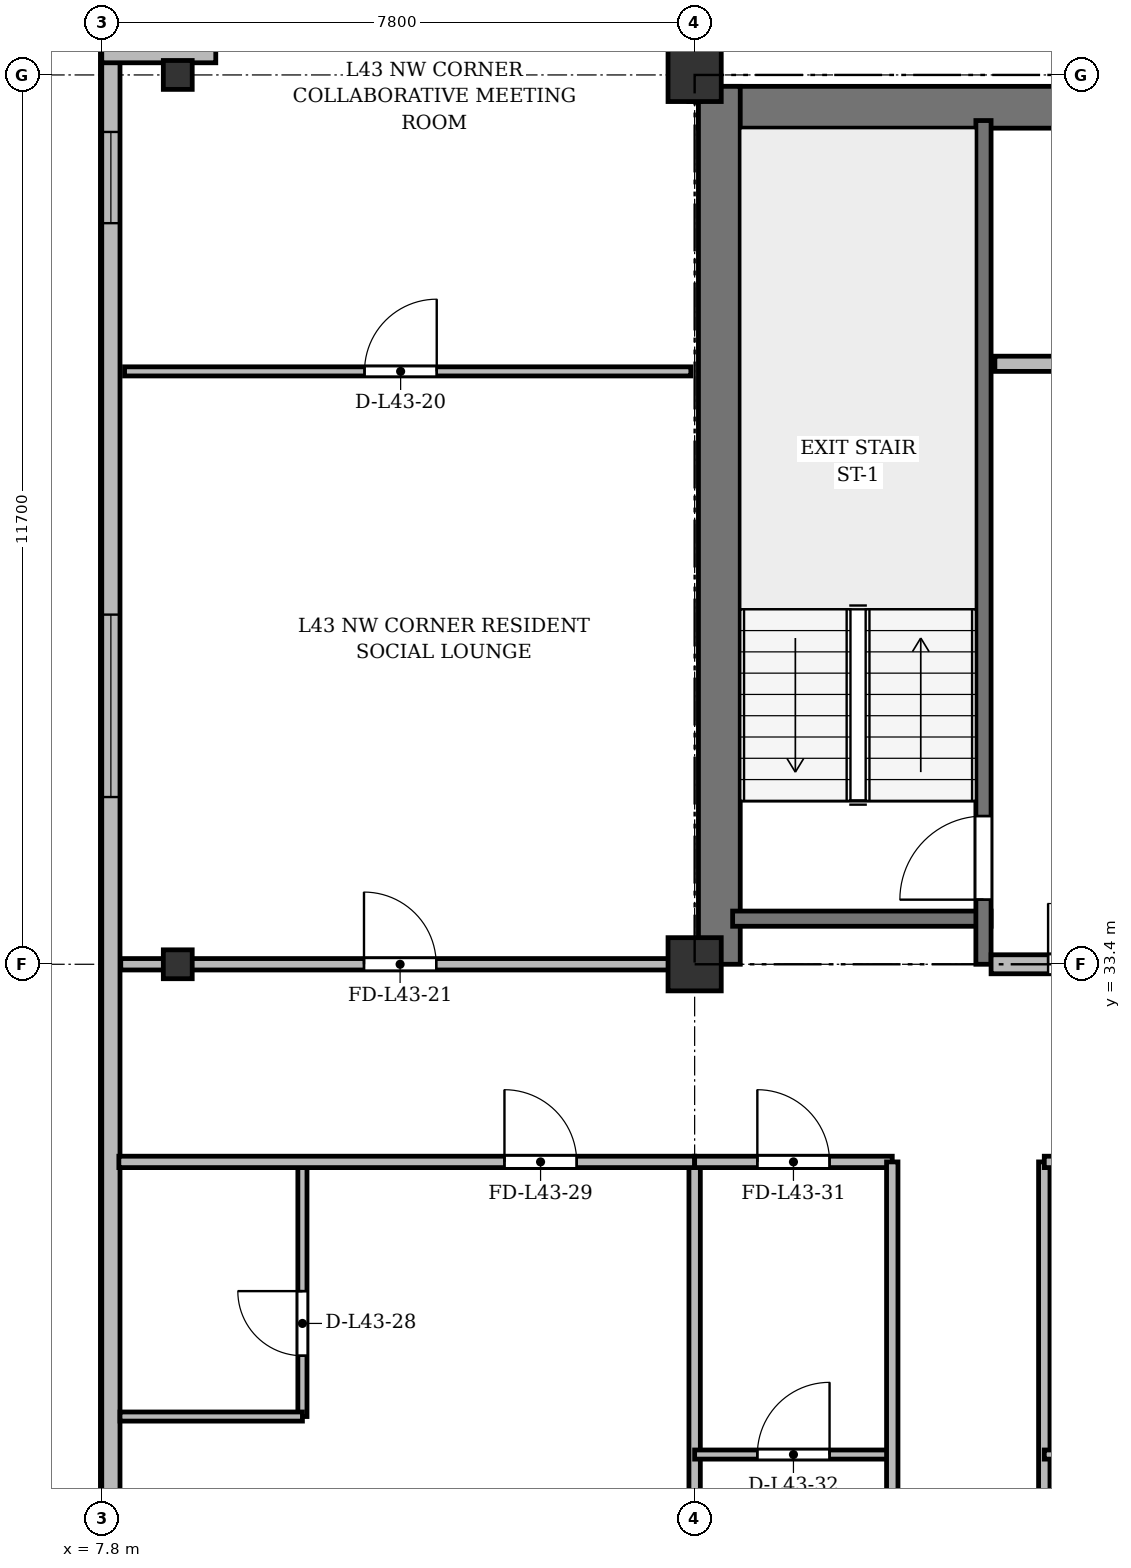
"""IFC4 building model, lengths in metres.
Left out: names, types, materials, properties, quantities, classifications, styles, units other than length and angle.
Written with IfcOpenShell. Run it as: python <this file> out.ifc"""

import sys

from ifc_helpers import new_model, si_unit, direction, frame, frame_2d, origin, origin_2d, place, context, subcontext, project, spatial, rectangle, i_section, extrude, source, transform, mapped, element, fill, save


model = new_model("IFC4")
c1 = context("Model", 3, precision=1e-05, world=origin(), true_north=direction((0.0, 1.0)))
c2 = subcontext(c1, "Body", "Model", "MODEL_VIEW")
j1 = project(units=[si_unit("LENGTHUNIT", "METRE"), si_unit("PLANEANGLEUNIT", "RADIAN")], contexts=[c1])
p1 = place(None, origin())
s1 = spatial("IfcSite", under=j1, at=p1, CompositionType="ELEMENT")
p2 = place(p1, origin())
s2 = spatial("IfcBuilding", under=s1, at=p2, CompositionType="ELEMENT")
p3 = place(p2, frame((0.0, 0.0, 164.5)))
s3 = spatial("IfcBuildingStorey", under=s2, at=p3, CompositionType="ELEMENT", Elevation=164.5)
m1 = source(origin(), c2, "Body", "SweptSolid", [
    extrude(i_section(OverallWidth=0.38, OverallDepth=0.38, WebThickness=0.02, FlangeThickness=0.03, at=origin_2d()), origin(), (0.0, 0.0, 1.0), 3.6),
])
for number, where, z_axis, x_axis in (
    (1, (8.8, 33.4, 0.0), (0.0, 0.0, 1.0), (1.0, 0.0, 0.0)),
    (2, (8.8, 45.1, 0.0), (0.0, 0.0, 1.0), (1.0, 0.0, 0.0)),
):
    element("IfcColumn", number, at=place(p3, frame(where, z_axis=z_axis, x_axis=x_axis)), inside=s3, PredefinedType="COLUMN", context=c2, shape_type="MappedRepresentation", body=[
        mapped(m1, transform((0.0, 0.0, 0.0), x_axis=(1.0, 0.0, 0.0), y_axis=(0.0, 1.0, 0.0), z_axis=(0.0, 0.0, 1.0), scale=1.0)),
    ])
m2 = source(origin(), c2, "Body", "SweptSolid", [
    extrude(rectangle(XDim=0.7, YDim=0.7, at=origin_2d()), origin(), (0.0, 0.0, 1.0), 3.6),
])
for number, where, z_axis, x_axis in (
    (3, (15.6, 33.4, 0.0), (0.0, 0.0, 1.0), (1.0, 0.0, 0.0)),
    (4, (15.6, 45.1, 0.0), (0.0, 0.0, 1.0), (1.0, 0.0, 0.0)),
):
    element("IfcColumn", number, at=place(p3, frame(where, z_axis=z_axis, x_axis=x_axis)), inside=s3, PredefinedType="COLUMN", context=c2, shape_type="MappedRepresentation", body=[
        mapped(m2, transform((0.0, 0.0, 0.0), x_axis=(1.0, 0.0, 0.0), y_axis=(0.0, 1.0, 0.0), z_axis=(0.0, 0.0, 1.0), scale=1.0)),
    ])
p4 = place(p3, frame((7.92, 6.3, 0.0), z_axis=(0.0, 0.0, 1.0), x_axis=(0.0, 1.0, 0.0)))
e5 = element("IfcWall", 5, at=p4, inside=s3, PredefinedType="SOLIDWALL", context=c2, shape_type="SweptSolid", body=[
    extrude(rectangle(XDim=39.2, YDim=0.24, at=frame_2d((19.6, 0.0))), origin(), (0.0, 0.0, 1.0), 3.35),
])
p5 = place(p4, frame((1.45, 0.0, 0.92)))
e6 = element("IfcOpeningElement", 6, at=p5, cuts=e5, PredefinedType="OPENING", context=c2, shape_type="SweptSolid", body=[
    extrude(rectangle(XDim=1.2, YDim=1.65, at=frame_2d((0.6, 0.825))), frame((0.0, 0.13, 0.0), z_axis=(0.0, -1.0, 0.0), x_axis=(1.0, 0.0, 0.0)), (0.0, 0.0, 1.0), 0.26),
])
p6 = place(p4, frame((3.9, 0.0, 0.92)))
e7 = element("IfcOpeningElement", 7, at=p6, cuts=e5, PredefinedType="OPENING", context=c2, shape_type="SweptSolid", body=[
    extrude(rectangle(XDim=2.4, YDim=2.1, at=frame_2d((1.2, 1.05))), frame((0.0, 0.13, 0.0), z_axis=(0.0, -1.0, 0.0), x_axis=(1.0, 0.0, 0.0)), (0.0, 0.0, 1.0), 0.26),
])
p7 = place(p4, frame((8.1, 0.0, 0.92)))
e8 = element("IfcOpeningElement", 8, at=p7, cuts=e5, PredefinedType="OPENING", context=c2, shape_type="SweptSolid", body=[
    extrude(rectangle(XDim=2.4, YDim=2.1, at=frame_2d((1.2, 1.05))), frame((0.0, 0.13, 0.0), z_axis=(0.0, -1.0, 0.0), x_axis=(1.0, 0.0, 0.0)), (0.0, 0.0, 1.0), 0.26),
])
p8 = place(p4, frame((15.3, 0.0, 0.92)))
e9 = element("IfcOpeningElement", 9, at=p8, cuts=e5, PredefinedType="OPENING", context=c2, shape_type="SweptSolid", body=[
    extrude(rectangle(XDim=2.4, YDim=2.1, at=frame_2d((1.2, 1.05))), frame((0.0, 0.13, 0.0), z_axis=(0.0, -1.0, 0.0), x_axis=(1.0, 0.0, 0.0)), (0.0, 0.0, 1.0), 0.26),
])
p9 = place(p4, frame((29.3, 0.0, 0.92)))
e10 = element("IfcOpeningElement", 10, at=p9, cuts=e5, PredefinedType="OPENING", context=c2, shape_type="SweptSolid", body=[
    extrude(rectangle(XDim=2.4, YDim=2.1, at=frame_2d((1.2, 1.05))), frame((0.0, 0.13, 0.0), z_axis=(0.0, -1.0, 0.0), x_axis=(1.0, 0.0, 0.0)), (0.0, 0.0, 1.0), 0.26),
])
p10 = place(p4, frame((36.85, 0.0, 0.92)))
e11 = element("IfcOpeningElement", 11, at=p10, cuts=e5, PredefinedType="OPENING", context=c2, shape_type="SweptSolid", body=[
    extrude(rectangle(XDim=1.2, YDim=1.65, at=frame_2d((0.6, 0.825))), frame((0.0, 0.13, 0.0), z_axis=(0.0, -1.0, 0.0), x_axis=(1.0, 0.0, 0.0)), (0.0, 0.0, 1.0), 0.26),
])
p11 = place(p3, frame((7.8, 45.38, 0.0), z_axis=(0.0, 0.0, 1.0), x_axis=(1.0, 0.0, 0.0)))
e12 = element("IfcWall", 12, at=p11, inside=s3, PredefinedType="SOLIDWALL", context=c2, shape_type="SweptSolid", body=[
    extrude(rectangle(XDim=1.5, YDim=0.24, at=frame_2d((0.75, 0.0))), origin(), (0.0, 0.0, 1.0), 3.35),
])
p12 = place(p3, frame((15.65, 44.675, 0.0), z_axis=(0.0, 0.0, 1.0), x_axis=(1.0, 0.0, 0.0)))
e13 = element("IfcWall", 13, at=p12, inside=s3, PredefinedType="SHEAR", context=c2, shape_type="SweptSolid", body=[
    extrude(rectangle(XDim=43.1, YDim=0.55, at=frame_2d((21.55, 0.0))), origin(), (0.0, 0.0, 1.0), 3.35),
])
p13 = place(p3, frame((15.925, 33.4, 0.0), z_axis=(0.0, 0.0, 1.0), x_axis=(0.0, 1.0, 0.0)))
e14 = element("IfcWall", 14, at=p13, inside=s3, PredefinedType="SHEAR", context=c2, shape_type="SweptSolid", body=[
    extrude(rectangle(XDim=11.55, YDim=0.55, at=frame_2d((5.775, 0.0))), origin(), (0.0, 0.0, 1.0), 3.35),
])
p14 = place(p3, frame((16.1, 34.0, 0.0), z_axis=(0.0, 0.0, 1.0), x_axis=(1.0, 0.0, 0.0)))
e15 = element("IfcWall", 15, at=p14, inside=s3, PredefinedType="SHEAR", context=c2, shape_type="SweptSolid", body=[
    extrude(rectangle(XDim=3.4, YDim=0.2, at=frame_2d((1.7, 0.0))), origin(), (0.0, 0.0, 1.0), 3.35),
])
p15 = place(p3, frame((19.4, 33.4, 0.0), z_axis=(0.0, 0.0, 1.0), x_axis=(0.0, 1.0, 0.0)))
e16 = element("IfcWall", 16, at=p15, inside=s3, PredefinedType="SHEAR", context=c2, shape_type="SweptSolid", body=[
    extrude(rectangle(XDim=11.1, YDim=0.2, at=frame_2d((5.55, 0.0))), origin(), (0.0, 0.0, 1.0), 3.35),
])
p16 = place(p15, frame((0.85, 0.0, 0.0)))
e17 = element("IfcOpeningElement", 17, at=p16, cuts=e16, PredefinedType="OPENING", context=c2, shape_type="SweptSolid", body=[
    extrude(rectangle(XDim=1.1, YDim=2.15, at=frame_2d((0.55, 1.075))), frame((0.0, 0.11, 0.0), z_axis=(0.0, -1.0, 0.0), x_axis=(1.0, 0.0, 0.0)), (0.0, 0.0, 1.0), 0.22),
])
p17 = place(p3, frame((19.55, 41.3, 0.0), z_axis=(0.0, 0.0, 1.0), x_axis=(1.0, 0.0, 0.0)))
e18 = element("IfcWall", 18, at=p17, inside=s3, PredefinedType="SOLIDWALL", context=c2, shape_type="SweptSolid", body=[
    extrude(rectangle(XDim=6.75, YDim=0.2, at=frame_2d((3.375, 0.0))), origin(), (0.0, 0.0, 1.0), 3.35),
])
p18 = place(p17, frame((1.7, 0.0, 0.0)))
e19 = element("IfcOpeningElement", 19, at=p18, cuts=e18, PredefinedType="OPENING", context=c2, shape_type="SweptSolid", body=[
    extrude(rectangle(XDim=1.1, YDim=2.15, at=frame_2d((0.55, 1.075))), frame((0.0, 0.11, 0.0), z_axis=(0.0, -1.0, 0.0), x_axis=(1.0, 0.0, 0.0)), (0.0, 0.0, 1.0), 0.22),
])
p19 = place(p17, frame((4.4, 0.0, 0.0)))
e20 = element("IfcOpeningElement", 20, at=p19, cuts=e18, PredefinedType="OPENING", context=c2, shape_type="SweptSolid", body=[
    extrude(rectangle(XDim=1.1, YDim=2.15, at=frame_2d((0.55, 1.075))), frame((0.0, 0.11, 0.0), z_axis=(0.0, -1.0, 0.0), x_axis=(1.0, 0.0, 0.0)), (0.0, 0.0, 1.0), 0.22),
])
p20 = place(p3, frame((19.5, 33.4, 0.0), z_axis=(0.0, 0.0, 1.0), x_axis=(1.0, 0.0, 0.0)))
e21 = element("IfcWall", 21, at=p20, inside=s3, PredefinedType="PARTITIONING", context=c2, shape_type="SweptSolid", body=[
    extrude(rectangle(XDim=6.8, YDim=0.25, at=frame_2d((3.4, 0.0))), origin(), (0.0, 0.0, 1.0), 2.75),
])
p21 = place(p20, frame((0.75, 0.0, 0.0)))
e22 = element("IfcOpeningElement", 22, at=p21, cuts=e21, PredefinedType="OPENING", context=c2, shape_type="SweptSolid", body=[
    extrude(rectangle(XDim=1.6, YDim=2.2, at=frame_2d((0.8, 1.1))), frame((0.0, 0.135, 0.0), z_axis=(0.0, -1.0, 0.0), x_axis=(1.0, 0.0, 0.0)), (0.0, 0.0, 1.0), 0.27),
])
p22 = place(p3, frame((8.1, 41.2, 0.0), z_axis=(0.0, 0.0, 1.0), x_axis=(1.0, 0.0, 0.0)))
e23 = element("IfcWall", 23, at=p22, inside=s3, PredefinedType="PARTITIONING", context=c2, shape_type="SweptSolid", body=[
    extrude(rectangle(XDim=7.45, YDim=0.12, at=frame_2d((3.725, 0.0))), origin(), (0.0, 0.0, 1.0), 2.85),
])
p23 = place(p22, frame((3.157, 0.0, 0.0)))
e24 = element("IfcOpeningElement", 24, at=p23, cuts=e23, PredefinedType="OPENING", context=c2, shape_type="SweptSolid", body=[
    extrude(rectangle(XDim=0.95, YDim=2.15, at=frame_2d((0.475, 1.075))), frame((0.0, 0.07, 0.0), z_axis=(0.0, -1.0, 0.0), x_axis=(1.0, 0.0, 0.0)), (0.0, 0.0, 1.0), 0.14),
])
p24 = place(p3, frame((8.05, 33.4, 0.0), z_axis=(0.0, 0.0, 1.0), x_axis=(1.0, 0.0, 0.0)))
e25 = element("IfcWall", 25, at=p24, inside=s3, PredefinedType="PARTITIONING", context=c2, shape_type="SweptSolid", body=[
    extrude(rectangle(XDim=7.55, YDim=0.15, at=frame_2d((3.775, 0.0))), origin(), (0.0, 0.0, 1.0), 2.75),
])
p25 = place(p24, frame((3.2, 0.0, 0.0)))
e26 = element("IfcOpeningElement", 26, at=p25, cuts=e25, PredefinedType="OPENING", context=c2, shape_type="SweptSolid", body=[
    extrude(rectangle(XDim=0.95, YDim=2.15, at=frame_2d((0.475, 1.075))), frame((0.0, 0.085, 0.0), z_axis=(0.0, -1.0, 0.0), x_axis=(1.0, 0.0, 0.0)), (0.0, 0.0, 1.0), 0.17),
])
p26 = place(p3, frame((15.6, 44.75, 0.0), z_axis=(0.0, 0.0, 1.0), x_axis=(0.0, 1.0, 0.0)))
e27 = element("IfcWall", 27, at=p26, inside=s3, PredefinedType="PARTITIONING", context=c2, shape_type="SweptSolid", body=[
    extrude(rectangle(XDim=3.61, YDim=0.15, at=frame_2d((1.805, 0.0))), origin(), (0.0, 0.0, 1.0), 2.85),
])
p27 = place(p26, frame((1.1, 0.0, 0.0)))
e28 = element("IfcOpeningElement", 28, at=p27, cuts=e27, PredefinedType="OPENING", context=c2, shape_type="SweptSolid", body=[
    extrude(rectangle(XDim=0.95, YDim=2.15, at=frame_2d((0.475, 1.075))), frame((0.0, 0.085, 0.0), z_axis=(0.0, -1.0, 0.0), x_axis=(1.0, 0.0, 0.0)), (0.0, 0.0, 1.0), 0.17),
])
p28 = place(p3, frame((15.6, 3.525, 0.0), z_axis=(0.0, 0.0, 1.0), x_axis=(0.0, 1.0, 0.0)))
e29 = element("IfcWall", 29, at=p28, inside=s3, PredefinedType="PARTITIONING", context=c2, shape_type="SweptSolid", body=[
    extrude(rectangle(XDim=27.275, YDim=0.15, at=frame_2d((13.638, 0.0))), origin(), (0.0, 0.0, 1.0), 2.85),
])
p29 = place(p3, frame((10.44, 27.45, 0.0), z_axis=(0.0, 0.0, 1.0), x_axis=(0.0, 1.0, 0.0)))
e30 = element("IfcWall", 30, at=p29, inside=s3, PredefinedType="PARTITIONING", context=c2, shape_type="SweptSolid", body=[
    extrude(rectangle(XDim=3.35, YDim=0.12, at=frame_2d((1.675, 0.0))), origin(), (0.0, 0.0, 1.0), 3.35),
])
p30 = place(p29, frame((0.8, 0.0, 0.0)))
e31 = element("IfcOpeningElement", 31, at=p30, cuts=e30, PredefinedType="OPENING", context=c2, shape_type="SweptSolid", body=[
    extrude(rectangle(XDim=0.85, YDim=2.1, at=frame_2d((0.425, 1.05))), frame((0.0, 0.07, 0.0), z_axis=(0.0, -1.0, 0.0), x_axis=(1.0, 0.0, 0.0)), (0.0, 0.0, 1.0), 0.14),
])
p31 = place(p3, frame((8.04, 27.45, 0.0), z_axis=(0.0, 0.0, 1.0), x_axis=(1.0, 0.0, 0.0)))
e32 = element("IfcWall", 32, at=p31, inside=s3, PredefinedType="PARTITIONING", context=c2, shape_type="SweptSolid", body=[
    extrude(rectangle(XDim=2.4, YDim=0.12, at=frame_2d((1.2, 0.0))), origin(), (0.0, 0.0, 1.0), 2.85),
])
p32 = place(p3, frame((8.025, 30.8, 0.0), z_axis=(0.0, 0.0, 1.0), x_axis=(1.0, 0.0, 0.0)))
e33 = element("IfcWall", 33, at=p32, inside=s3, PredefinedType="PARTITIONING", context=c2, shape_type="SweptSolid", body=[
    extrude(rectangle(XDim=7.575, YDim=0.15, at=frame_2d((3.788, 0.0))), origin(), (0.0, 0.0, 1.0), 2.85),
])
p33 = place(p32, frame((5.073, 0.0, 0.0)))
e34 = element("IfcOpeningElement", 34, at=p33, cuts=e33, PredefinedType="OPENING", context=c2, shape_type="SweptSolid", body=[
    extrude(rectangle(XDim=0.95, YDim=2.15, at=frame_2d((0.475, 1.075))), frame((0.0, 0.085, 0.0), z_axis=(0.0, -1.0, 0.0), x_axis=(1.0, 0.0, 0.0)), (0.0, 0.0, 1.0), 0.17),
])
p34 = place(p3, frame((15.6, 30.8, 0.0), z_axis=(0.0, 0.0, 1.0), x_axis=(1.0, 0.0, 0.0)))
e35 = element("IfcWall", 35, at=p34, inside=s3, PredefinedType="PARTITIONING", context=c2, shape_type="SweptSolid", body=[
    extrude(rectangle(XDim=2.6, YDim=0.15, at=frame_2d((1.3, 0.0))), origin(), (0.0, 0.0, 1.0), 2.85),
])
p35 = place(p34, frame((0.825, 0.0, 0.0)))
e36 = element("IfcOpeningElement", 36, at=p35, cuts=e35, PredefinedType="OPENING", context=c2, shape_type="SweptSolid", body=[
    extrude(rectangle(XDim=0.95, YDim=2.15, at=frame_2d((0.475, 1.075))), frame((0.0, 0.085, 0.0), z_axis=(0.0, -1.0, 0.0), x_axis=(1.0, 0.0, 0.0)), (0.0, 0.0, 1.0), 0.17),
])
p36 = place(p3, frame((15.6, 26.95, 0.0), z_axis=(0.0, 0.0, 1.0), x_axis=(1.0, 0.0, 0.0)))
e37 = element("IfcWall", 37, at=p36, inside=s3, PredefinedType="PARTITIONING", context=c2, shape_type="SweptSolid", body=[
    extrude(rectangle(XDim=2.6, YDim=0.12, at=frame_2d((1.3, 0.0))), origin(), (0.0, 0.0, 1.0), 2.85),
])
p37 = place(p36, frame((0.825, 0.0, 0.0)))
e38 = element("IfcOpeningElement", 38, at=p37, cuts=e37, PredefinedType="OPENING", context=c2, shape_type="SweptSolid", body=[
    extrude(rectangle(XDim=0.95, YDim=2.15, at=frame_2d((0.475, 1.075))), frame((0.0, 0.07, 0.0), z_axis=(0.0, -1.0, 0.0), x_axis=(1.0, 0.0, 0.0)), (0.0, 0.0, 1.0), 0.14),
])
for number, where, z_axis, x_axis in (
    (39, (18.2, 3.525, 0.0), (0.0, 0.0, 1.0), (0.0, 1.0, 0.0)),
    (40, (20.2, 3.525, 0.0), (0.0, 0.0, 1.0), (0.0, 1.0, 0.0)),
):
    element("IfcWall", number, at=place(p3, frame(where, z_axis=z_axis, x_axis=x_axis)), inside=s3, PredefinedType="PARTITIONING", context=c2, shape_type="SweptSolid", body=[
        extrude(rectangle(XDim=27.275, YDim=0.15, at=frame_2d((13.638, 0.0))), origin(), (0.0, 0.0, 1.0), 2.75),
    ])
p38 = place(p3, frame((20.2, 30.8, 0.0), z_axis=(0.0, 0.0, 1.0), x_axis=(1.0, 0.0, 0.0)))
e41 = element("IfcWall", 41, at=p38, inside=s3, PredefinedType="PARTITIONING", context=c2, shape_type="SweptSolid", body=[
    extrude(rectangle(XDim=3.2, YDim=0.15, at=frame_2d((1.6, 0.0))), origin(), (0.0, 0.0, 1.0), 2.85),
])
p39 = place(p38, frame((1.125, 0.0, 0.0)))
e42 = element("IfcOpeningElement", 42, at=p39, cuts=e41, PredefinedType="OPENING", context=c2, shape_type="SweptSolid", body=[
    extrude(rectangle(XDim=0.95, YDim=2.15, at=frame_2d((0.475, 1.075))), frame((0.0, 0.085, 0.0), z_axis=(0.0, -1.0, 0.0), x_axis=(1.0, 0.0, 0.0)), (0.0, 0.0, 1.0), 0.17),
])
p40 = place(p3, frame((20.2, 26.95, 0.0), z_axis=(0.0, 0.0, 1.0), x_axis=(1.0, 0.0, 0.0)))
e43 = element("IfcWall", 43, at=p40, inside=s3, PredefinedType="PARTITIONING", context=c2, shape_type="SweptSolid", body=[
    extrude(rectangle(XDim=3.2, YDim=0.12, at=frame_2d((1.6, 0.0))), origin(), (0.0, 0.0, 1.0), 2.85),
])
p41 = place(p40, frame((1.125, 0.0, 0.0)))
e44 = element("IfcOpeningElement", 44, at=p41, cuts=e43, PredefinedType="OPENING", context=c2, shape_type="SweptSolid", body=[
    extrude(rectangle(XDim=0.95, YDim=2.15, at=frame_2d((0.475, 1.075))), frame((0.0, 0.07, 0.0), z_axis=(0.0, -1.0, 0.0), x_axis=(1.0, 0.0, 0.0)), (0.0, 0.0, 1.0), 0.14),
])
m3 = source(origin(), c2, "Body", "SweptSolid", [
    extrude(rectangle(XDim=2.4, YDim=2.1, at=frame_2d((1.2, 1.05))), frame((0.0, 0.03, 0.0), z_axis=(0.0, -1.0, 0.0), x_axis=(1.0, 0.0, 0.0)), (0.0, 0.0, 1.0), 0.06),
])
p42 = place(p9, origin())
e45 = element("IfcWindow", 45, at=p42, inside=s3, PartitioningType="SINGLE_PANEL", PredefinedType="WINDOW", context=c2, shape_type="MappedRepresentation", body=[
    mapped(m3, transform((0.0, 0.0, 0.0), x_axis=(1.0, 0.0, 0.0), y_axis=(0.0, 1.0, 0.0), z_axis=(0.0, 0.0, 1.0), scale=1.0)),
])
fill(e10, e45)
m4 = source(origin(), c2, "Body", "SweptSolid", [
    extrude(rectangle(XDim=1.2, YDim=1.65, at=frame_2d((0.6, 0.825))), frame((0.0, 0.03, 0.0), z_axis=(0.0, -1.0, 0.0), x_axis=(1.0, 0.0, 0.0)), (0.0, 0.0, 1.0), 0.06),
])
p43 = place(p10, origin())
e46 = element("IfcWindow", 46, at=p43, inside=s3, PartitioningType="SINGLE_PANEL", PredefinedType="WINDOW", context=c2, shape_type="MappedRepresentation", body=[
    mapped(m4, transform((0.0, 0.0, 0.0), x_axis=(1.0, 0.0, 0.0), y_axis=(0.0, 1.0, 0.0), z_axis=(0.0, 0.0, 1.0), scale=1.0)),
])
fill(e11, e46)
m5 = source(origin(), c2, "Body", "SweptSolid", [
    extrude(rectangle(XDim=1.1, YDim=2.15, at=frame_2d((0.55, 1.075))), frame((0.0, 0.025, 0.0), z_axis=(0.0, -1.0, 0.0), x_axis=(1.0, 0.0, 0.0)), (0.0, 0.0, 1.0), 0.05),
])
p44 = place(p16, origin())
e47 = element("IfcDoor", 47, at=p44, inside=s3, OperationType="SINGLE_SWING_LEFT", PredefinedType="DOOR", context=c2, shape_type="MappedRepresentation", body=[
    mapped(m5, transform((0.0, 0.0, 0.0), x_axis=(1.0, 0.0, 0.0), y_axis=(0.0, 1.0, 0.0), z_axis=(0.0, 0.0, 1.0), scale=1.0)),
])
fill(e17, e47)
m6 = source(origin(), c2, "Body", "SweptSolid", [
    extrude(rectangle(XDim=1.6, YDim=2.2, at=frame_2d((0.8, 1.1))), frame((0.0, 0.025, 0.0), z_axis=(0.0, -1.0, 0.0), x_axis=(1.0, 0.0, 0.0)), (0.0, 0.0, 1.0), 0.05),
])
p45 = place(p21, origin())
e48 = element("IfcDoor", 48, at=p45, inside=s3, OperationType="DOUBLE_DOOR_SINGLE_SWING", PredefinedType="DOOR", context=c2, shape_type="MappedRepresentation", body=[
    mapped(m6, transform((0.0, 0.0, 0.0), x_axis=(1.0, 0.0, 0.0), y_axis=(0.0, 1.0, 0.0), z_axis=(0.0, 0.0, 1.0), scale=1.0)),
])
fill(e22, e48)
m7 = source(origin(), c2, "Body", "SweptSolid", [
    extrude(rectangle(XDim=0.95, YDim=2.15, at=frame_2d((0.475, 1.075))), frame((0.0, 0.025, 0.0), z_axis=(0.0, -1.0, 0.0), x_axis=(1.0, 0.0, 0.0)), (0.0, 0.0, 1.0), 0.05),
])
p46 = place(p23, origin())
e49 = element("IfcDoor", 49, at=p46, inside=s3, OperationType="SINGLE_SWING_RIGHT", PredefinedType="DOOR", context=c2, shape_type="MappedRepresentation", body=[
    mapped(m7, transform((0.0, 0.0, 0.0), x_axis=(1.0, 0.0, 0.0), y_axis=(0.0, 1.0, 0.0), z_axis=(0.0, 0.0, 1.0), scale=1.0)),
])
fill(e24, e49)
p47 = place(p25, origin())
e50 = element("IfcDoor", 50, at=p47, inside=s3, OperationType="SINGLE_SWING_LEFT", PredefinedType="DOOR", context=c2, shape_type="MappedRepresentation", body=[
    mapped(m7, transform((0.0, 0.0, 0.0), x_axis=(1.0, 0.0, 0.0), y_axis=(0.0, 1.0, 0.0), z_axis=(0.0, 0.0, 1.0), scale=1.0)),
])
fill(e26, e50)
m8 = source(origin(), c2, "Body", "SweptSolid", [
    extrude(rectangle(XDim=0.85, YDim=2.1, at=frame_2d((0.425, 1.05))), frame((0.0, 0.025, 0.0), z_axis=(0.0, -1.0, 0.0), x_axis=(1.0, 0.0, 0.0)), (0.0, 0.0, 1.0), 0.05),
])
p48 = place(p30, origin())
e51 = element("IfcDoor", 51, at=p48, inside=s3, OperationType="SINGLE_SWING_RIGHT", PredefinedType="DOOR", context=c2, shape_type="MappedRepresentation", body=[
    mapped(m8, transform((0.0, 0.0, 0.0), x_axis=(1.0, 0.0, 0.0), y_axis=(0.0, 1.0, 0.0), z_axis=(0.0, 0.0, 1.0), scale=1.0)),
])
fill(e31, e51)
p49 = place(p33, origin())
e52 = element("IfcDoor", 52, at=p49, inside=s3, OperationType="SINGLE_SWING_LEFT", PredefinedType="DOOR", context=c2, shape_type="MappedRepresentation", body=[
    mapped(m7, transform((0.0, 0.0, 0.0), x_axis=(1.0, 0.0, 0.0), y_axis=(0.0, 1.0, 0.0), z_axis=(0.0, 0.0, 1.0), scale=1.0)),
])
fill(e34, e52)
p50 = place(p35, origin())
e53 = element("IfcDoor", 53, at=p50, inside=s3, OperationType="SINGLE_SWING_LEFT", PredefinedType="DOOR", context=c2, shape_type="MappedRepresentation", body=[
    mapped(m7, transform((0.0, 0.0, 0.0), x_axis=(1.0, 0.0, 0.0), y_axis=(0.0, 1.0, 0.0), z_axis=(0.0, 0.0, 1.0), scale=1.0)),
])
fill(e36, e53)
p51 = place(p37, origin())
e54 = element("IfcDoor", 54, at=p51, inside=s3, OperationType="SINGLE_SWING_RIGHT", PredefinedType="DOOR", context=c2, shape_type="MappedRepresentation", body=[
    mapped(m7, transform((0.0, 0.0, 0.0), x_axis=(1.0, 0.0, 0.0), y_axis=(0.0, 1.0, 0.0), z_axis=(0.0, 0.0, 1.0), scale=1.0)),
])
fill(e38, e54)
save(model, sys.argv[1])
